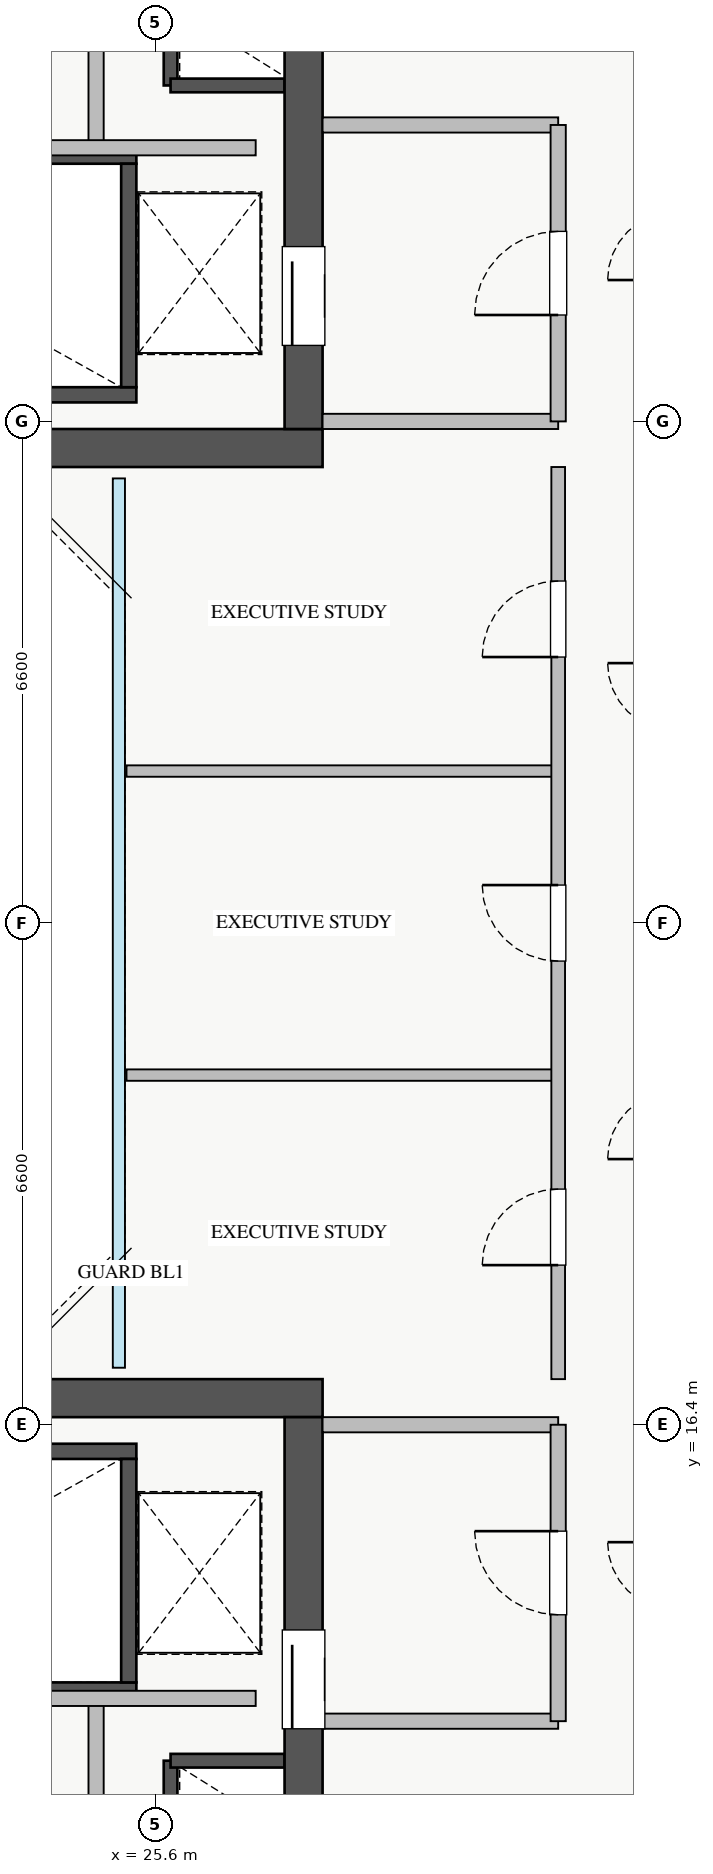
"""IFC4 building model, lengths in metres.
Left out: names, types, materials, properties, quantities, classifications, styles, units other than length and angle.
Written with IfcOpenShell. Run it as: python <this file> out.ifc"""

import sys

from ifc_helpers import new_model, si_unit, direction, frame, frame_2d, origin, place, context, subcontext, project, spatial, rectangle, extrude, source, transform, mapped, element, fill, save


model = new_model("IFC4")
c1 = context("Model", 3, precision=1e-05, world=origin(), true_north=direction((0.0, 1.0)))
c2 = subcontext(c1, "Body", "Model", "MODEL_VIEW")
j1 = project(units=[si_unit("LENGTHUNIT", "METRE"), si_unit("PLANEANGLEUNIT", "RADIAN")], contexts=[c1])
p1 = place(None, origin())
s1 = spatial("IfcSite", under=j1, at=p1, CompositionType="ELEMENT")
p2 = place(p1, origin())
s2 = spatial("IfcBuilding", under=s1, at=p2, CompositionType="ELEMENT")
p3 = place(p2, frame((0.0, 0.0, 216.5)))
s3 = spatial("IfcBuildingStorey", under=s2, at=p3, CompositionType="ELEMENT", Elevation=216.5)
p4 = place(p3, frame((25.8, 34.02, 0.0), z_axis=(0.0, 0.0, 1.0), x_axis=(0.0, 1.0, 0.0)))
e1 = element("IfcWall", 1, at=p4, inside=s3, PredefinedType="SHEAR", context=c2, shape_type="SweptSolid", body=[
    extrude(rectangle(XDim=1.06, YDim=0.18, at=frame_2d((0.53, 0.0))), origin(), (0.0, 0.0, 1.0), 3.07),
])
p5 = place(p3, frame((25.8, 34.02, 0.0), z_axis=(0.0, 0.0, 1.0), x_axis=(1.0, 0.0, 0.0)))
e2 = element("IfcWall", 2, at=p5, inside=s3, PredefinedType="SHEAR", context=c2, shape_type="SweptSolid", body=[
    extrude(rectangle(XDim=1.5, YDim=0.18, at=frame_2d((0.75, 0.0))), origin(), (0.0, 0.0, 1.0), 3.07),
])
p6 = place(p3, frame((25.8, 10.92, 0.0), z_axis=(0.0, 0.0, 1.0), x_axis=(0.0, 1.0, 0.0)))
e3 = element("IfcWall", 3, at=p6, inside=s3, PredefinedType="SHEAR", context=c2, shape_type="SweptSolid", body=[
    extrude(rectangle(XDim=1.06, YDim=0.18, at=frame_2d((0.53, 0.0))), origin(), (0.0, 0.0, 1.0), 3.07),
])
p7 = place(p3, frame((25.8, 11.98, 0.0), z_axis=(0.0, 0.0, 1.0), x_axis=(1.0, 0.0, 0.0)))
e4 = element("IfcWall", 4, at=p7, inside=s3, PredefinedType="SHEAR", context=c2, shape_type="SweptSolid", body=[
    extrude(rectangle(XDim=1.5, YDim=0.18, at=frame_2d((0.75, 0.0))), origin(), (0.0, 0.0, 1.0), 3.07),
])
p8 = place(p3, frame((18.2, 29.95, 0.0), z_axis=(0.0, 0.0, 1.0), x_axis=(1.0, 0.0, 0.0)))
e5 = element("IfcWall", 5, at=p8, inside=s3, PredefinedType="SHEAR", context=c2, shape_type="SweptSolid", body=[
    extrude(rectangle(XDim=7.15, YDim=0.2, at=frame_2d((3.575, 0.0))), origin(), (0.0, 0.0, 1.0), 3.25),
])
p9 = place(p3, frame((18.2, 33.09, 0.0), z_axis=(0.0, 0.0, 1.0), x_axis=(1.0, 0.0, 0.0)))
e6 = element("IfcWall", 6, at=p9, inside=s3, PredefinedType="SHEAR", context=c2, shape_type="SweptSolid", body=[
    extrude(rectangle(XDim=7.15, YDim=0.2, at=frame_2d((3.575, 0.0))), origin(), (0.0, 0.0, 1.0), 3.25),
])
p10 = place(p9, frame((0.35, 0.0, 0.0)))
e7 = element("IfcOpeningElement", 7, at=p10, cuts=e6, PredefinedType="OPENING", context=c2, shape_type="SweptSolid", body=[
    extrude(rectangle(XDim=1.1, YDim=2.05, at=frame_2d((0.55, 1.025))), frame((0.0, 0.11, 0.0), z_axis=(0.0, -1.0, 0.0), x_axis=(1.0, 0.0, 0.0)), (0.0, 0.0, 1.0), 0.22),
])
p11 = place(p3, frame((25.25, 30.05, 0.0), z_axis=(0.0, 0.0, 1.0), x_axis=(0.0, 1.0, 0.0)))
e8 = element("IfcWall", 8, at=p11, inside=s3, PredefinedType="SHEAR", context=c2, shape_type="SweptSolid", body=[
    extrude(rectangle(XDim=2.94, YDim=0.2, at=frame_2d((1.47, 0.0))), origin(), (0.0, 0.0, 1.0), 3.25),
])
p12 = place(p3, frame((18.2, 12.91, 0.0), z_axis=(0.0, 0.0, 1.0), x_axis=(1.0, 0.0, 0.0)))
e9 = element("IfcWall", 9, at=p12, inside=s3, PredefinedType="SHEAR", context=c2, shape_type="SweptSolid", body=[
    extrude(rectangle(XDim=7.15, YDim=0.2, at=frame_2d((3.575, 0.0))), origin(), (0.0, 0.0, 1.0), 3.25),
])
p13 = place(p12, frame((0.35, 0.0, 0.0)))
e10 = element("IfcOpeningElement", 10, at=p13, cuts=e9, PredefinedType="OPENING", context=c2, shape_type="SweptSolid", body=[
    extrude(rectangle(XDim=1.1, YDim=2.05, at=frame_2d((0.55, 1.025))), frame((0.0, 0.11, 0.0), z_axis=(0.0, -1.0, 0.0), x_axis=(1.0, 0.0, 0.0)), (0.0, 0.0, 1.0), 0.22),
])
p14 = place(p3, frame((18.2, 16.05, 0.0), z_axis=(0.0, 0.0, 1.0), x_axis=(1.0, 0.0, 0.0)))
e11 = element("IfcWall", 11, at=p14, inside=s3, PredefinedType="SHEAR", context=c2, shape_type="SweptSolid", body=[
    extrude(rectangle(XDim=7.15, YDim=0.2, at=frame_2d((3.575, 0.0))), origin(), (0.0, 0.0, 1.0), 3.25),
])
p15 = place(p3, frame((25.25, 13.01, 0.0), z_axis=(0.0, 0.0, 1.0), x_axis=(0.0, 1.0, 0.0)))
e12 = element("IfcWall", 12, at=p15, inside=s3, PredefinedType="SHEAR", context=c2, shape_type="SweptSolid", body=[
    extrude(rectangle(XDim=2.94, YDim=0.2, at=frame_2d((1.47, 0.0))), origin(), (0.0, 0.0, 1.0), 3.25),
])
p16 = place(p3, frame((10.2, 29.25, 0.0), z_axis=(0.0, 0.0, 1.0), x_axis=(1.0, 0.0, 0.0)))
e13 = element("IfcWall", 13, at=p16, inside=s3, PredefinedType="SHEAR", context=c2, shape_type="SweptSolid", body=[
    extrude(rectangle(XDim=17.6, YDim=0.5, at=frame_2d((8.8, 0.0))), origin(), (0.0, 0.0, 1.0), 3.25),
])
p17 = place(p3, frame((27.55, 29.5, 0.0), z_axis=(0.0, 0.0, 1.0), x_axis=(0.0, 1.0, 0.0)))
e14 = element("IfcWall", 14, at=p17, inside=s3, PredefinedType="SHEAR", context=c2, shape_type="SweptSolid", body=[
    extrude(rectangle(XDim=6.2, YDim=0.5, at=frame_2d((3.1, 0.0))), origin(), (0.0, 0.0, 1.0), 3.25),
])
p18 = place(p17, frame((1.1, 0.0, 0.0)))
e15 = element("IfcOpeningElement", 15, at=p18, cuts=e14, PredefinedType="OPENING", context=c2, shape_type="SweptSolid", body=[
    extrude(rectangle(XDim=1.3, YDim=2.05, at=frame_2d((0.65, 1.025))), frame((0.0, 0.26, 0.0), z_axis=(0.0, -1.0, 0.0), x_axis=(1.0, 0.0, 0.0)), (0.0, 0.0, 1.0), 0.52),
])
p19 = place(p3, frame((10.2, 16.75, 0.0), z_axis=(0.0, 0.0, 1.0), x_axis=(1.0, 0.0, 0.0)))
e16 = element("IfcWall", 16, at=p19, inside=s3, PredefinedType="SHEAR", context=c2, shape_type="SweptSolid", body=[
    extrude(rectangle(XDim=17.6, YDim=0.5, at=frame_2d((8.8, 0.0))), origin(), (0.0, 0.0, 1.0), 3.25),
])
p20 = place(p3, frame((27.55, 10.3, 0.0), z_axis=(0.0, 0.0, 1.0), x_axis=(0.0, 1.0, 0.0)))
e17 = element("IfcWall", 17, at=p20, inside=s3, PredefinedType="SHEAR", context=c2, shape_type="SweptSolid", body=[
    extrude(rectangle(XDim=6.2, YDim=0.5, at=frame_2d((3.1, 0.0))), origin(), (0.0, 0.0, 1.0), 3.25),
])
p21 = place(p20, frame((2.1, 0.0, 0.0)))
e18 = element("IfcOpeningElement", 18, at=p21, cuts=e17, PredefinedType="OPENING", context=c2, shape_type="SweptSolid", body=[
    extrude(rectangle(XDim=1.3, YDim=2.05, at=frame_2d((0.65, 1.025))), frame((0.0, 0.26, 0.0), z_axis=(0.0, -1.0, 0.0), x_axis=(1.0, 0.0, 0.0)), (0.0, 0.0, 1.0), 0.52),
])
p22 = place(p3, frame((27.8, 29.6, 0.0), z_axis=(0.0, 0.0, 1.0), x_axis=(1.0, 0.0, 0.0)))
e19 = element("IfcWall", 19, at=p22, inside=s3, PredefinedType="PARTITIONING", context=c2, shape_type="SweptSolid", body=[
    extrude(rectangle(XDim=3.1, YDim=0.2, at=frame_2d((1.55, 0.0))), origin(), (0.0, 0.0, 1.0), 3.07),
])
p23 = place(p3, frame((27.8, 33.5, 0.0), z_axis=(0.0, 0.0, 1.0), x_axis=(1.0, 0.0, 0.0)))
e20 = element("IfcWall", 20, at=p23, inside=s3, PredefinedType="PARTITIONING", context=c2, shape_type="SweptSolid", body=[
    extrude(rectangle(XDim=3.1, YDim=0.2, at=frame_2d((1.55, 0.0))), origin(), (0.0, 0.0, 1.0), 2.265),
])
p24 = place(p3, frame((30.9, 29.6, 0.0), z_axis=(0.0, 0.0, 1.0), x_axis=(0.0, 1.0, 0.0)))
e21 = element("IfcWall", 21, at=p24, inside=s3, PredefinedType="PARTITIONING", context=c2, shape_type="SweptSolid", body=[
    extrude(rectangle(XDim=3.9, YDim=0.2, at=frame_2d((1.95, 0.0))), origin(), (0.0, 0.0, 1.0), 3.07),
])
p25 = place(p24, frame((1.4, 0.0, 0.0)))
e22 = element("IfcOpeningElement", 22, at=p25, cuts=e21, PredefinedType="OPENING", context=c2, shape_type="SweptSolid", body=[
    extrude(rectangle(XDim=1.1, YDim=2.05, at=frame_2d((0.55, 1.025))), frame((0.0, 0.11, 0.0), z_axis=(0.0, -1.0, 0.0), x_axis=(1.0, 0.0, 0.0)), (0.0, 0.0, 1.0), 0.22),
])
p26 = place(p3, frame((27.8, 16.4, 0.0), z_axis=(0.0, 0.0, 1.0), x_axis=(1.0, 0.0, 0.0)))
e23 = element("IfcWall", 23, at=p26, inside=s3, PredefinedType="PARTITIONING", context=c2, shape_type="SweptSolid", body=[
    extrude(rectangle(XDim=3.1, YDim=0.2, at=frame_2d((1.55, 0.0))), origin(), (0.0, 0.0, 1.0), 3.07),
])
p27 = place(p3, frame((27.8, 12.5, 0.0), z_axis=(0.0, 0.0, 1.0), x_axis=(1.0, 0.0, 0.0)))
e24 = element("IfcWall", 24, at=p27, inside=s3, PredefinedType="PARTITIONING", context=c2, shape_type="SweptSolid", body=[
    extrude(rectangle(XDim=3.1, YDim=0.2, at=frame_2d((1.55, 0.0))), origin(), (0.0, 0.0, 1.0), 2.265),
])
p28 = place(p3, frame((30.9, 12.5, 0.0), z_axis=(0.0, 0.0, 1.0), x_axis=(0.0, 1.0, 0.0)))
e25 = element("IfcWall", 25, at=p28, inside=s3, PredefinedType="PARTITIONING", context=c2, shape_type="SweptSolid", body=[
    extrude(rectangle(XDim=3.9, YDim=0.2, at=frame_2d((1.95, 0.0))), origin(), (0.0, 0.0, 1.0), 3.07),
])
p29 = place(p28, frame((1.4, 0.0, 0.0)))
e26 = element("IfcOpeningElement", 26, at=p29, cuts=e25, PredefinedType="OPENING", context=c2, shape_type="SweptSolid", body=[
    extrude(rectangle(XDim=1.1, YDim=2.05, at=frame_2d((0.55, 1.025))), frame((0.0, 0.11, 0.0), z_axis=(0.0, -1.0, 0.0), x_axis=(1.0, 0.0, 0.0)), (0.0, 0.0, 1.0), 0.22),
])
for number, where, z_axis, x_axis in (
    (27, (24.82, 33.2, 0.0), (0.0, 0.0, 1.0), (0.0, 1.0, 0.0)),
    (28, (24.82, 10.15, 0.0), (0.0, 0.0, 1.0), (0.0, 1.0, 0.0)),
):
    element("IfcWall", number, at=place(p3, frame(where, z_axis=z_axis, x_axis=x_axis)), inside=s3, PredefinedType="PARTITIONING", context=c2, shape_type="SweptSolid", body=[
        extrude(rectangle(XDim=2.65, YDim=0.2, at=frame_2d((1.325, 0.0))), origin(), (0.0, 0.0, 1.0), 3.07),
    ])
for number, where, z_axis, x_axis in (
    (29, (21.75, 33.2, 0.0), (0.0, 0.0, 1.0), (1.0, 0.0, 0.0)),
    (30, (21.75, 12.8, 0.0), (0.0, 0.0, 1.0), (1.0, 0.0, 0.0)),
):
    element("IfcWall", number, at=place(p3, frame(where, z_axis=z_axis, x_axis=x_axis)), inside=s3, PredefinedType="PARTITIONING", context=c2, shape_type="SweptSolid", body=[
        extrude(rectangle(XDim=5.17, YDim=0.2, at=frame_2d((2.585, 0.0))), origin(), (0.0, 0.0, 1.0), 3.07),
    ])
for number, where, z_axis, x_axis in (
    (31, (25.22, 21.0, 0.0), (0.0, 0.0, 1.0), (1.0, 0.0, 0.0)),
    (32, (25.22, 25.0, 0.0), (0.0, 0.0, 1.0), (1.0, 0.0, 0.0)),
):
    element("IfcWall", number, at=place(p3, frame(where, z_axis=z_axis, x_axis=x_axis)), inside=s3, PredefinedType="PARTITIONING", context=c2, shape_type="SweptSolid", body=[
        extrude(rectangle(XDim=5.68, YDim=0.15, at=frame_2d((2.84, 0.0))), origin(), (0.0, 0.0, 1.0), 3.07),
    ])
p30 = place(p3, frame((30.9, 17.0, 0.0), z_axis=(0.0, 0.0, 1.0), x_axis=(0.0, 1.0, 0.0)))
e33 = element("IfcWall", 33, at=p30, inside=s3, PredefinedType="PARTITIONING", context=c2, shape_type="SweptSolid", body=[
    extrude(rectangle(XDim=12.0, YDim=0.18, at=frame_2d((6.0, 0.0))), origin(), (0.0, 0.0, 1.0), 3.07),
])
p31 = place(p30, frame((1.5, 0.0, 0.0)))
e34 = element("IfcOpeningElement", 34, at=p31, cuts=e33, PredefinedType="OPENING", context=c2, shape_type="SweptSolid", body=[
    extrude(rectangle(XDim=1.0, YDim=2.05, at=frame_2d((0.5, 1.025))), frame((0.0, 0.1, 0.0), z_axis=(0.0, -1.0, 0.0), x_axis=(1.0, 0.0, 0.0)), (0.0, 0.0, 1.0), 0.2),
])
p32 = place(p30, frame((5.5, 0.0, 0.0)))
e35 = element("IfcOpeningElement", 35, at=p32, cuts=e33, PredefinedType="OPENING", context=c2, shape_type="SweptSolid", body=[
    extrude(rectangle(XDim=1.0, YDim=2.05, at=frame_2d((0.5, 1.025))), frame((0.0, 0.1, 0.0), z_axis=(0.0, -1.0, 0.0), x_axis=(1.0, 0.0, 0.0)), (0.0, 0.0, 1.0), 0.2),
])
p33 = place(p30, frame((9.5, 0.0, 0.0)))
e36 = element("IfcOpeningElement", 36, at=p33, cuts=e33, PredefinedType="OPENING", context=c2, shape_type="SweptSolid", body=[
    extrude(rectangle(XDim=1.0, YDim=2.05, at=frame_2d((0.5, 1.025))), frame((0.0, 0.1, 0.0), z_axis=(0.0, -1.0, 0.0), x_axis=(1.0, 0.0, 0.0)), (0.0, 0.0, 1.0), 0.2),
])
m1 = source(origin(), c2, "Body", "SweptSolid", [
    extrude(rectangle(XDim=1.3, YDim=2.05, at=frame_2d((0.65, 1.025))), frame((0.0, 0.025, 0.0), z_axis=(0.0, -1.0, 0.0), x_axis=(1.0, 0.0, 0.0)), (0.0, 0.0, 1.0), 0.05),
])
p34 = place(p18, origin())
e37 = element("IfcDoor", 37, at=p34, inside=s3, OperationType="SLIDING_TO_LEFT", PredefinedType="DOOR", context=c2, shape_type="MappedRepresentation", body=[
    mapped(m1, transform((0.0, 0.0, 0.0), x_axis=(1.0, 0.0, 0.0), y_axis=(0.0, 1.0, 0.0), z_axis=(0.0, 0.0, 1.0), scale=1.0)),
])
fill(e15, e37)
p35 = place(p21, origin())
e38 = element("IfcDoor", 38, at=p35, inside=s3, OperationType="SLIDING_TO_RIGHT", PredefinedType="DOOR", context=c2, shape_type="MappedRepresentation", body=[
    mapped(m1, transform((0.0, 0.0, 0.0), x_axis=(1.0, 0.0, 0.0), y_axis=(0.0, 1.0, 0.0), z_axis=(0.0, 0.0, 1.0), scale=1.0)),
])
fill(e18, e38)
m2 = source(origin(), c2, "Body", "SweptSolid", [
    extrude(rectangle(XDim=1.1, YDim=2.05, at=frame_2d((0.55, 1.025))), frame((0.0, 0.025, 0.0), z_axis=(0.0, -1.0, 0.0), x_axis=(1.0, 0.0, 0.0)), (0.0, 0.0, 1.0), 0.05),
])
p36 = place(p25, origin())
e39 = element("IfcDoor", 39, at=p36, inside=s3, OperationType="SINGLE_SWING_LEFT", PredefinedType="DOOR", context=c2, shape_type="MappedRepresentation", body=[
    mapped(m2, transform((0.0, 0.0, 0.0), x_axis=(1.0, 0.0, 0.0), y_axis=(0.0, 1.0, 0.0), z_axis=(0.0, 0.0, 1.0), scale=1.0)),
])
fill(e22, e39)
p37 = place(p29, origin())
e40 = element("IfcDoor", 40, at=p37, inside=s3, OperationType="SINGLE_SWING_RIGHT", PredefinedType="DOOR", context=c2, shape_type="MappedRepresentation", body=[
    mapped(m2, transform((0.0, 0.0, 0.0), x_axis=(1.0, 0.0, 0.0), y_axis=(0.0, 1.0, 0.0), z_axis=(0.0, 0.0, 1.0), scale=1.0)),
])
fill(e26, e40)
m3 = source(origin(), c2, "Body", "SweptSolid", [
    extrude(rectangle(XDim=1.0, YDim=2.05, at=frame_2d((0.5, 1.025))), frame((0.0, 0.025, 0.0), z_axis=(0.0, -1.0, 0.0), x_axis=(1.0, 0.0, 0.0)), (0.0, 0.0, 1.0), 0.05),
])
p38 = place(p31, origin())
e41 = element("IfcDoor", 41, at=p38, inside=s3, OperationType="SINGLE_SWING_LEFT", PredefinedType="DOOR", context=c2, shape_type="MappedRepresentation", body=[
    mapped(m3, transform((0.0, 0.0, 0.0), x_axis=(1.0, 0.0, 0.0), y_axis=(0.0, 1.0, 0.0), z_axis=(0.0, 0.0, 1.0), scale=1.0)),
])
fill(e34, e41)
p39 = place(p32, origin())
e42 = element("IfcDoor", 42, at=p39, inside=s3, OperationType="SINGLE_SWING_RIGHT", PredefinedType="DOOR", context=c2, shape_type="MappedRepresentation", body=[
    mapped(m3, transform((0.0, 0.0, 0.0), x_axis=(1.0, 0.0, 0.0), y_axis=(0.0, 1.0, 0.0), z_axis=(0.0, 0.0, 1.0), scale=1.0)),
])
fill(e35, e42)
p40 = place(p33, origin())
e43 = element("IfcDoor", 43, at=p40, inside=s3, OperationType="SINGLE_SWING_LEFT", PredefinedType="DOOR", context=c2, shape_type="MappedRepresentation", body=[
    mapped(m3, transform((0.0, 0.0, 0.0), x_axis=(1.0, 0.0, 0.0), y_axis=(0.0, 1.0, 0.0), z_axis=(0.0, 0.0, 1.0), scale=1.0)),
])
fill(e36, e43)
save(model, sys.argv[1])
